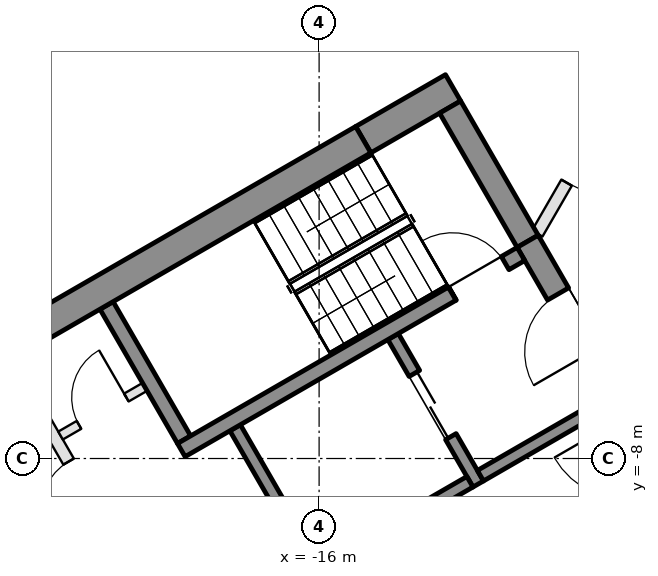
"""IFC4 building model, lengths in metres.
Left out: names, types, materials, properties, quantities, classifications, styles, units other than length and angle.
Written with IfcOpenShell. Run it as: python <this file> out.ifc"""

import sys

from ifc_helpers import new_model, si_unit, direction, frame, frame_2d, origin, place, context, subcontext, project, spatial, rectangle, extrude, element, fill, save


model = new_model("IFC4")
c1 = context("Model", 3, precision=1e-05, world=origin(), true_north=direction((0.0, 1.0)))
c2 = subcontext(c1, "Body", "Model", "MODEL_VIEW")
j1 = project(units=[si_unit("LENGTHUNIT", "METRE"), si_unit("PLANEANGLEUNIT", "RADIAN")], contexts=[c1])
p1 = place(None, origin())
s1 = spatial("IfcSite", under=j1, at=p1, CompositionType="ELEMENT")
p2 = place(p1, origin())
s2 = spatial("IfcBuilding", under=s1, at=p2, CompositionType="ELEMENT")
p3 = place(p2, frame((0.0, 0.0, 131.6)))
s3 = spatial("IfcBuildingStorey", under=s2, at=p3, CompositionType="ELEMENT", Elevation=131.6)
p4 = place(p3, frame((-19.496, -5.482, 0.0), z_axis=(0.0, 0.0, 1.0), x_axis=(0.499990435942, -0.866030925526, 0.0)))
e1 = element("IfcWall", 1, at=p4, inside=s3, PredefinedType="SHEAR", context=c2, shape_type="SweptSolid", body=[
    extrude(rectangle(XDim=2.55, YDim=0.25, at=frame_2d((1.275, 0.0))), origin(), (0.0, 0.0, 1.0), 5.7),
])
p5 = place(p3, frame((-17.381, -7.495, 0.0), z_axis=(0.0, 0.0, 1.0), x_axis=(0.500011755427, -0.866018616679, 0.0)))
e2 = element("IfcWall", 2, at=p5, inside=s3, PredefinedType="SHEAR", context=c2, shape_type="SweptSolid", body=[
    extrude(rectangle(XDim=2.8, YDim=0.2, at=frame_2d((1.4, 0.0))), origin(), (0.0, 0.0, 1.0), 5.7),
])
p6 = place(p3, frame((-14.783, -5.995, 0.0), z_axis=(0.0, 0.0, 1.0), x_axis=(0.49994636267, -0.866056369097, 0.0)))
e3 = element("IfcWall", 3, at=p6, inside=s3, PredefinedType="SHEAR", context=c2, shape_type="SweptSolid", body=[
    extrude(rectangle(XDim=2.8, YDim=0.2, at=frame_2d((1.4, 0.0))), origin(), (0.0, 0.0, 1.0), 5.7),
])
p7 = place(p6, frame((0.7, 0.0, 0.0)))
e4 = element("IfcOpeningElement", 4, at=p7, cuts=e3, PredefinedType="OPENING", context=c2, shape_type="SweptSolid", body=[
    extrude(rectangle(XDim=1.2, YDim=2.1, at=frame_2d((0.6, 1.05))), frame((0.0, 0.11, 0.0), z_axis=(0.0, -1.0, 0.0), x_axis=(1.0, 0.0, 0.0)), (0.0, 0.0, 1.0), 0.22),
])
p8 = place(p3, frame((-13.52, -8.383, 0.0), z_axis=(0.0, 0.0, 1.0), x_axis=(-0.866034573852, -0.49998411664, 0.0)))
e5 = element("IfcWall", 5, at=p8, inside=s3, PredefinedType="SHEAR", context=c2, shape_type="SweptSolid", body=[
    extrude(rectangle(XDim=2.8, YDim=0.2, at=frame_2d((1.4, 0.0))), origin(), (0.0, 0.0, 1.0), 5.7),
])
p9 = place(p3, frame((-11.268, -7.083, 0.0), z_axis=(0.0, 0.0, 1.0), x_axis=(-0.866050077142, -0.499957262057, 0.0)))
e6 = element("IfcWall", 6, at=p9, inside=s3, PredefinedType="SHEAR", context=c2, shape_type="SweptSolid", body=[
    extrude(rectangle(XDim=2.4, YDim=0.2, at=frame_2d((1.2, 0.0))), origin(), (0.0, 0.0, 1.0), 5.7),
])
p10 = place(p3, frame((-21.076, -6.395, 0.0), z_axis=(0.0, 0.0, 1.0), x_axis=(0.50001468107, -0.866016927499, 0.0)))
e7 = element("IfcWall", 7, at=p10, inside=s3, PredefinedType="PARTITIONING", context=c2, shape_type="SweptSolid", body=[
    extrude(rectangle(XDim=5.4, YDim=0.2, at=frame_2d((2.7, 0.0))), origin(), (0.0, 0.0, 1.0), 5.7),
])
p11 = place(p10, frame((1.913, 0.0, 0.0)))
e8 = element("IfcOpeningElement", 8, at=p11, cuts=e7, PredefinedType="OPENING", context=c2, shape_type="SweptSolid", body=[
    extrude(rectangle(XDim=0.9, YDim=2.1, at=frame_2d((0.45, 1.05))), frame((0.0, 0.11, 0.0), z_axis=(0.0, -1.0, 0.0), x_axis=(1.0, 0.0, 0.0)), (0.0, 0.0, 1.0), 0.22),
])
p12 = place(p10, frame((3.788, 0.0, 0.0)))
e9 = element("IfcOpeningElement", 9, at=p12, cuts=e7, PredefinedType="OPENING", context=c2, shape_type="SweptSolid", body=[
    extrude(rectangle(XDim=0.9, YDim=2.1, at=frame_2d((0.45, 1.05))), frame((0.0, 0.11, 0.0), z_axis=(0.0, -1.0, 0.0), x_axis=(1.0, 0.0, 0.0)), (0.0, 0.0, 1.0), 0.22),
])
p13 = place(p3, frame((-18.866, -6.822, 0.0), z_axis=(0.0, 0.0, 1.0), x_axis=(-0.866028054938, -0.499995408039, 0.0)))
e10 = element("IfcWall", 10, at=p13, inside=s3, PredefinedType="PARTITIONING", context=c2, shape_type="SweptSolid", body=[
    extrude(rectangle(XDim=1.6, YDim=0.15, at=frame_2d((0.8, 0.0))), origin(), (0.0, 0.0, 1.0), 5.7),
])
p14 = place(p13, frame((0.35, 0.0, 0.0)))
e11 = element("IfcOpeningElement", 11, at=p14, cuts=e10, PredefinedType="OPENING", context=c2, shape_type="SweptSolid", body=[
    extrude(rectangle(XDim=0.9, YDim=2.1, at=frame_2d((0.45, 1.05))), frame((0.0, 0.085, 0.0), z_axis=(0.0, -1.0, 0.0), x_axis=(1.0, 0.0, 0.0)), (0.0, 0.0, 1.0), 0.17),
])
p15 = place(p3, frame((-13.797, -1.903, 0.0), z_axis=(0.0, 0.0, 1.0), x_axis=(-0.866033076574, -0.499986710104, 0.0)))
e12 = element("IfcWall", 12, at=p15, inside=s3, PredefinedType="SHEAR", context=c2, shape_type="SweptSolid", body=[
    extrude(rectangle(XDim=1.706, YDim=0.5, at=frame_2d((0.853, 0.0))), origin(), (0.0, 0.0, 1.0), 5.7),
])
p16 = place(p3, frame((-15.274, -2.756, 0.0), z_axis=(0.0, 0.0, 1.0), x_axis=(-0.86602396135, -0.500002498361, 0.0)))
e13 = element("IfcWall", 13, at=p16, inside=s3, PredefinedType="SHEAR", context=c2, shape_type="SweptSolid", body=[
    extrude(rectangle(XDim=13.131, YDim=0.5, at=frame_2d((6.565, 0.0))), origin(), (0.0, 0.0, 1.0), 5.7),
])
p17 = place(p3, frame((-13.845, -2.22, 0.0), z_axis=(0.0, 0.0, 1.0), x_axis=(0.500062241894, -0.865989465428, 0.0)))
e14 = element("IfcWall", 14, at=p17, inside=s3, PredefinedType="SHEAR", context=c2, shape_type="SweptSolid", body=[
    extrude(rectangle(XDim=2.55, YDim=0.4, at=frame_2d((1.275, 0.0))), origin(), (0.0, 0.0, 1.0), 5.7),
])
p18 = place(p3, frame((-12.57, -4.428, 0.0), z_axis=(0.0, 0.0, 1.0), x_axis=(0.499984378957, -0.86603442241, 0.0)))
e15 = element("IfcWall", 15, at=p18, inside=s3, PredefinedType="SHEAR", context=c2, shape_type="SweptSolid", body=[
    extrude(rectangle(XDim=7.45, YDim=0.4, at=frame_2d((3.725, 0.0))), origin(), (0.0, 0.0, 1.0), 5.7),
])
p19 = place(p18, frame((1.0, 0.0, 0.0)))
e16 = element("IfcOpeningElement", 16, at=p19, cuts=e15, PredefinedType="OPENING", context=c2, shape_type="SweptSolid", body=[
    extrude(rectangle(XDim=1.1, YDim=2.1, at=frame_2d((0.55, 1.05))), frame((0.0, 0.21, 0.0), z_axis=(0.0, -1.0, 0.0), x_axis=(1.0, 0.0, 0.0)), (0.0, 0.0, 1.0), 0.42),
])
p20 = place(p18, frame((3.3, 0.0, 0.0)))
e17 = element("IfcOpeningElement", 17, at=p20, cuts=e15, PredefinedType="OPENING", context=c2, shape_type="SweptSolid", body=[
    extrude(rectangle(XDim=1.4, YDim=2.1, at=frame_2d((0.7, 1.05))), frame((0.0, 0.21, 0.0), z_axis=(0.0, -1.0, 0.0), x_axis=(1.0, 0.0, 0.0)), (0.0, 0.0, 1.0), 0.42),
])
p21 = place(p3, frame((-12.681, -4.636, 0.0), z_axis=(0.0, 0.0, 1.0), x_axis=(-0.86601437931, -0.500019094464, 0.0)))
e18 = element("IfcWall", 18, at=p21, inside=s3, PredefinedType="SHEAR", context=c2, shape_type="SweptSolid", body=[
    extrude(rectangle(XDim=1.306, YDim=0.25, at=frame_2d((0.653, 0.0))), origin(), (0.0, 0.0, 1.0), 5.7),
])
p22 = place(p21, frame((0.3, 0.0, 0.0)))
e19 = element("IfcOpeningElement", 19, at=p22, cuts=e18, PredefinedType="OPENING", context=c2, shape_type="SweptSolid", body=[
    extrude(rectangle(XDim=1.0, YDim=2.1, at=frame_2d((0.5, 1.05))), frame((0.0, 0.135, 0.0), z_axis=(0.0, -1.0, 0.0), x_axis=(1.0, 0.0, 0.0)), (0.0, 0.0, 1.0), 0.27),
])
p23 = place(p3, frame((-13.812, -5.29, 0.0), z_axis=(0.0, 0.0, 1.0), x_axis=(-0.866023561601, -0.500003190742, 0.0)))
e20 = element("IfcWall", 20, at=p23, inside=s3, PredefinedType="SHEAR", context=c2, shape_type="SweptSolid", body=[
    extrude(rectangle(XDim=5.144, YDim=0.25, at=frame_2d((2.572, 0.0))), origin(), (0.0, 0.0, 1.0), 5.7),
])
p24 = place(p3, frame((-2.482, 12.9, 0.0), z_axis=(0.0, 0.0, 1.0), x_axis=(-0.50000478328, -0.866022642139, 0.0)))
e21 = element("IfcWall", 21, at=p24, inside=s3, PredefinedType="PARTITIONING", context=c2, shape_type="SweptSolid", body=[
    extrude(rectangle(XDim=19.861, YDim=0.2, at=frame_2d((9.931, 0.0))), origin(), (0.0, 0.0, 1.0), 4.91),
])
p25 = place(p24, frame((2.643, 0.0, 0.0)))
e22 = element("IfcOpeningElement", 22, at=p25, cuts=e21, PredefinedType="OPENING", context=c2, shape_type="SweptSolid", body=[
    extrude(rectangle(XDim=1.5, YDim=2.1, at=frame_2d((0.75, 1.05))), frame((0.0, 0.11, 0.0), z_axis=(0.0, -1.0, 0.0), x_axis=(1.0, 0.0, 0.0)), (0.0, 0.0, 1.0), 0.22),
])
p26 = place(p24, frame((14.261, 0.0, 0.0)))
e23 = element("IfcOpeningElement", 23, at=p26, cuts=e21, PredefinedType="OPENING", context=c2, shape_type="SweptSolid", body=[
    extrude(rectangle(XDim=1.5, YDim=2.1, at=frame_2d((0.75, 1.05))), frame((0.0, 0.11, 0.0), z_axis=(0.0, -1.0, 0.0), x_axis=(1.0, 0.0, 0.0)), (0.0, 0.0, 1.0), 0.22),
])
p27 = place(p24, frame((17.394, 0.0, 0.0)))
e24 = element("IfcOpeningElement", 24, at=p27, cuts=e21, PredefinedType="OPENING", context=c2, shape_type="SweptSolid", body=[
    extrude(rectangle(XDim=1.5, YDim=2.1, at=frame_2d((0.75, 1.05))), frame((0.0, 0.11, 0.0), z_axis=(0.0, -1.0, 0.0), x_axis=(1.0, 0.0, 0.0)), (0.0, 0.0, 1.0), 0.22),
])
p28 = place(p24, frame((9.43, 0.0, 0.0)))
e25 = element("IfcOpeningElement", 25, at=p28, cuts=e21, PredefinedType="OPENING", context=c2, shape_type="SweptSolid", body=[
    extrude(rectangle(XDim=1.0, YDim=2.1, at=frame_2d((0.5, 1.05))), frame((0.0, 0.11, 0.0), z_axis=(0.0, -1.0, 0.0), x_axis=(1.0, 0.0, 0.0)), (0.0, 0.0, 1.0), 0.22),
])
p29 = place(p7, origin())
e26 = element("IfcDoor", 26, at=p29, inside=s3, OperationType="DOUBLE_DOOR_SLIDING", PredefinedType="DOOR", context=c2, shape_type="SweptSolid", body=[
    extrude(rectangle(XDim=1.2, YDim=2.1, at=frame_2d((0.6, 1.05))), frame((0.0, 0.025, 0.0), z_axis=(0.0, -1.0, 0.0), x_axis=(1.0, 0.0, 0.0)), (0.0, 0.0, 1.0), 0.05),
])
fill(e4, e26)
p30 = place(p14, frame((0.9, 0.0, 0.0), z_axis=(0.0, 0.0, 1.0), x_axis=(-1.0, 0.0, 0.0)))
e27 = element("IfcDoor", 27, at=p30, inside=s3, OperationType="SINGLE_SWING_RIGHT", PredefinedType="DOOR", context=c2, shape_type="SweptSolid", body=[
    extrude(rectangle(XDim=0.9, YDim=2.1, at=frame_2d((0.45, 1.05))), frame((0.0, 0.025, 0.0), z_axis=(0.0, -1.0, 0.0), x_axis=(1.0, 0.0, 0.0)), (0.0, 0.0, 1.0), 0.05),
])
fill(e11, e27)
p31 = place(p11, frame((0.9, 0.0, 0.0), z_axis=(0.0, 0.0, 1.0), x_axis=(-1.0, 0.0, 0.0)))
e28 = element("IfcDoor", 28, at=p31, inside=s3, OperationType="SINGLE_SWING_LEFT", PredefinedType="DOOR", context=c2, shape_type="SweptSolid", body=[
    extrude(rectangle(XDim=0.9, YDim=2.1, at=frame_2d((0.45, 1.05))), frame((0.0, 0.025, 0.0), z_axis=(0.0, -1.0, 0.0), x_axis=(1.0, 0.0, 0.0)), (0.0, 0.0, 1.0), 0.05),
])
fill(e8, e28)
p32 = place(p19, frame((1.1, 0.0, 0.0), z_axis=(0.0, 0.0, 1.0), x_axis=(-1.0, 0.0, 0.0)))
e29 = element("IfcDoor", 29, at=p32, inside=s3, OperationType="SINGLE_SWING_LEFT", PredefinedType="DOOR", context=c2, shape_type="SweptSolid", body=[
    extrude(rectangle(XDim=1.1, YDim=2.1, at=frame_2d((0.55, 1.05))), frame((0.0, 0.025, 0.0), z_axis=(0.0, -1.0, 0.0), x_axis=(1.0, 0.0, 0.0)), (0.0, 0.0, 1.0), 0.05),
])
fill(e16, e29)
p33 = place(p22, frame((1.0, 0.0, 0.0), z_axis=(0.0, 0.0, 1.0), x_axis=(-1.0, 0.0, 0.0)))
e30 = element("IfcDoor", 30, at=p33, inside=s3, OperationType="SINGLE_SWING_LEFT", PredefinedType="DOOR", context=c2, shape_type="SweptSolid", body=[
    extrude(rectangle(XDim=1.0, YDim=2.1, at=frame_2d((0.5, 1.05))), frame((0.0, 0.025, 0.0), z_axis=(0.0, -1.0, 0.0), x_axis=(1.0, 0.0, 0.0)), (0.0, 0.0, 1.0), 0.05),
])
fill(e19, e30)
p34 = place(p27, origin())
e31 = element("IfcDoor", 31, at=p34, inside=s3, OperationType="DOUBLE_DOOR_SINGLE_SWING", PredefinedType="DOOR", context=c2, shape_type="SweptSolid", body=[
    extrude(rectangle(XDim=1.5, YDim=2.1, at=frame_2d((0.75, 1.05))), frame((0.0, 0.025, 0.0), z_axis=(0.0, -1.0, 0.0), x_axis=(1.0, 0.0, 0.0)), (0.0, 0.0, 1.0), 0.05),
])
fill(e24, e31)
save(model, sys.argv[1])
